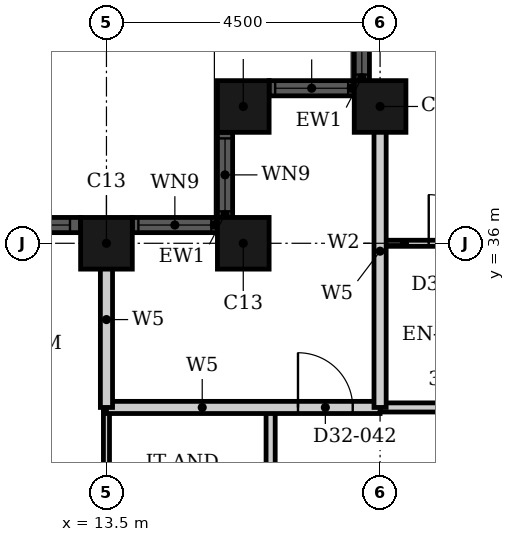
"""IFC4 building model, lengths in metres.
Left out: names, types, materials, properties, quantities, classifications, styles, units other than length and angle.
Written with IfcOpenShell. Run it as: python <this file> out.ifc"""

import sys

from ifc_helpers import new_model, si_unit, direction, frame, frame_2d, origin, origin_2d, place, context, subcontext, project, spatial, rectangle, hollow_rectangle, extrude, element, fill, save


model = new_model("IFC4")
c1 = context("Model", 3, precision=1e-05, world=origin(), true_north=direction((0.0, 1.0)))
c2 = subcontext(c1, "Body", "Model", "MODEL_VIEW")
j1 = project(units=[si_unit("LENGTHUNIT", "METRE"), si_unit("PLANEANGLEUNIT", "RADIAN")], contexts=[c1])
p1 = place(None, origin())
s1 = spatial("IfcSite", under=j1, at=p1, CompositionType="ELEMENT")
p2 = place(p1, origin())
s2 = spatial("IfcBuilding", under=s1, at=p2, CompositionType="ELEMENT")
p3 = place(p2, frame((0.0, 0.0, 129.6)))
s3 = spatial("IfcBuildingStorey", under=s2, at=p3, CompositionType="ELEMENT", Elevation=129.6)
for number, where, z_axis, x_axis in (
    (1, (18.0, 38.25, 0.0), (0.0, 0.0, 1.0), (1.0, 0.0, 0.0)),
    (2, (15.75, 38.25, 0.0), (0.0, 0.0, 1.0), (1.0, 0.0, 0.0)),
    (3, (15.75, 36.0, 0.0), (0.0, 0.0, 1.0), (1.0, 0.0, 0.0)),
    (4, (13.5, 36.0, 0.0), (0.0, 0.0, 1.0), (1.0, 0.0, 0.0)),
):
    element("IfcColumn", number, at=place(p3, frame(where, z_axis=z_axis, x_axis=x_axis)), inside=s3, PredefinedType="COLUMN", context=c2, shape_type="SweptSolid", body=[
        extrude(hollow_rectangle(XDim=0.85, YDim=0.85, WallThickness=0.026, at=origin_2d()), origin(), (0.0, 0.0, 1.0), 3.6),
    ])
p4 = place(p3, frame((17.7, 40.075, 0.0), z_axis=(0.0, 0.0, 1.0), x_axis=(0.0, -1.0, 0.0)))
e5 = element("IfcWall", 5, at=p4, inside=s3, PredefinedType="SOLIDWALL", context=c2, shape_type="SweptSolid", body=[
    extrude(rectangle(XDim=1.4, YDim=0.25, at=frame_2d((0.7, 0.0))), origin(), (0.0, 0.0, 1.0), 3.6),
])
p5 = place(p4, frame((0.1, 0.0, 0.9)))
e6 = element("IfcOpeningElement", 6, at=p5, cuts=e5, PredefinedType="OPENING", context=c2, shape_type="SweptSolid", body=[
    extrude(rectangle(XDim=1.2, YDim=2.08, at=frame_2d((0.6, 1.04))), frame((0.0, 0.135, 0.0), z_axis=(0.0, -1.0, 0.0), x_axis=(1.0, 0.0, 0.0)), (0.0, 0.0, 1.0), 0.27),
])
p6 = place(p3, frame((17.575, 38.55, 0.0), z_axis=(0.0, 0.0, 1.0), x_axis=(-1.0, 0.0, 0.0)))
e7 = element("IfcWall", 7, at=p6, inside=s3, PredefinedType="SOLIDWALL", context=c2, shape_type="SweptSolid", body=[
    extrude(rectangle(XDim=1.4, YDim=0.25, at=frame_2d((0.7, 0.0))), origin(), (0.0, 0.0, 1.0), 3.6),
])
p7 = place(p6, frame((0.1, 0.0, 0.9)))
e8 = element("IfcOpeningElement", 8, at=p7, cuts=e7, PredefinedType="OPENING", context=c2, shape_type="SweptSolid", body=[
    extrude(rectangle(XDim=1.2, YDim=2.08, at=frame_2d((0.6, 1.04))), frame((0.0, 0.135, 0.0), z_axis=(0.0, -1.0, 0.0), x_axis=(1.0, 0.0, 0.0)), (0.0, 0.0, 1.0), 0.27),
])
p8 = place(p3, frame((15.45, 37.825, 0.0), z_axis=(0.0, 0.0, 1.0), x_axis=(0.0, -1.0, 0.0)))
e9 = element("IfcWall", 9, at=p8, inside=s3, PredefinedType="SOLIDWALL", context=c2, shape_type="SweptSolid", body=[
    extrude(rectangle(XDim=1.4, YDim=0.25, at=frame_2d((0.7, 0.0))), origin(), (0.0, 0.0, 1.0), 3.6),
])
p9 = place(p8, frame((0.1, 0.0, 0.9)))
e10 = element("IfcOpeningElement", 10, at=p9, cuts=e9, PredefinedType="OPENING", context=c2, shape_type="SweptSolid", body=[
    extrude(rectangle(XDim=1.2, YDim=2.08, at=frame_2d((0.6, 1.04))), frame((0.0, 0.135, 0.0), z_axis=(0.0, -1.0, 0.0), x_axis=(1.0, 0.0, 0.0)), (0.0, 0.0, 1.0), 0.27),
])
p10 = place(p3, frame((15.325, 36.3, 0.0), z_axis=(0.0, 0.0, 1.0), x_axis=(-1.0, 0.0, 0.0)))
e11 = element("IfcWall", 11, at=p10, inside=s3, PredefinedType="SOLIDWALL", context=c2, shape_type="SweptSolid", body=[
    extrude(rectangle(XDim=1.4, YDim=0.25, at=frame_2d((0.7, 0.0))), origin(), (0.0, 0.0, 1.0), 3.6),
])
p11 = place(p10, frame((0.1, 0.0, 0.9)))
e12 = element("IfcOpeningElement", 12, at=p11, cuts=e11, PredefinedType="OPENING", context=c2, shape_type="SweptSolid", body=[
    extrude(rectangle(XDim=1.2, YDim=2.08, at=frame_2d((0.6, 1.04))), frame((0.0, 0.135, 0.0), z_axis=(0.0, -1.0, 0.0), x_axis=(1.0, 0.0, 0.0)), (0.0, 0.0, 1.0), 0.27),
])
p12 = place(p3, frame((13.075, 36.3, 0.0), z_axis=(0.0, 0.0, 1.0), x_axis=(-1.0, 0.0, 0.0)))
e13 = element("IfcWall", 13, at=p12, inside=s3, PredefinedType="SOLIDWALL", context=c2, shape_type="SweptSolid", body=[
    extrude(rectangle(XDim=8.15, YDim=0.25, at=frame_2d((4.075, 0.0))), origin(), (0.0, 0.0, 1.0), 3.6),
])
p13 = place(p12, frame((0.175, 0.0, 0.9)))
e14 = element("IfcOpeningElement", 14, at=p13, cuts=e13, PredefinedType="OPENING", context=c2, shape_type="SweptSolid", body=[
    extrude(rectangle(XDim=3.3, YDim=2.08, at=frame_2d((1.65, 1.04))), frame((0.0, 0.135, 0.0), z_axis=(0.0, -1.0, 0.0), x_axis=(1.0, 0.0, 0.0)), (0.0, 0.0, 1.0), 0.27),
])
p14 = place(p12, frame((4.675, 0.0, 0.9)))
e15 = element("IfcOpeningElement", 15, at=p14, cuts=e13, PredefinedType="OPENING", context=c2, shape_type="SweptSolid", body=[
    extrude(rectangle(XDim=3.3, YDim=2.08, at=frame_2d((1.65, 1.04))), frame((0.0, 0.135, 0.0), z_axis=(0.0, -1.0, 0.0), x_axis=(1.0, 0.0, 0.0)), (0.0, 0.0, 1.0), 0.27),
])
p15 = place(p3, frame((18.0, 33.3, 0.0), z_axis=(0.0, 0.0, 1.0), x_axis=(1.0, 0.0, 0.0)))
e16 = element("IfcWall", 16, at=p15, inside=s3, PredefinedType="PARTITIONING", context=c2, shape_type="SweptSolid", body=[
    extrude(rectangle(XDim=13.5, YDim=0.15, at=frame_2d((6.75, 0.0))), origin(), (0.0, 0.0, 1.0), 3.3),
])
p16 = place(p15, frame((2.95, 0.0, 0.0)))
e17 = element("IfcOpeningElement", 17, at=p16, cuts=e16, PredefinedType="OPENING", context=c2, shape_type="SweptSolid", body=[
    extrude(rectangle(XDim=1.0, YDim=2.1, at=frame_2d((0.5, 1.05))), frame((0.0, 0.085, 0.0), z_axis=(0.0, -1.0, 0.0), x_axis=(1.0, 0.0, 0.0)), (0.0, 0.0, 1.0), 0.17),
])
p17 = place(p15, frame((5.85, 0.0, 0.0)))
e18 = element("IfcOpeningElement", 18, at=p17, cuts=e16, PredefinedType="OPENING", context=c2, shape_type="SweptSolid", body=[
    extrude(rectangle(XDim=0.9, YDim=2.1, at=frame_2d((0.45, 1.05))), frame((0.0, 0.085, 0.0), z_axis=(0.0, -1.0, 0.0), x_axis=(1.0, 0.0, 0.0)), (0.0, 0.0, 1.0), 0.17),
])
p18 = place(p15, frame((10.35, 0.0, 0.0)))
e19 = element("IfcOpeningElement", 19, at=p18, cuts=e16, PredefinedType="OPENING", context=c2, shape_type="SweptSolid", body=[
    extrude(rectangle(XDim=0.9, YDim=2.1, at=frame_2d((0.45, 1.05))), frame((0.0, 0.085, 0.0), z_axis=(0.0, -1.0, 0.0), x_axis=(1.0, 0.0, 0.0)), (0.0, 0.0, 1.0), 0.17),
])
p19 = place(p3, frame((16.2, 27.0, 0.0), z_axis=(0.0, 0.0, 1.0), x_axis=(0.0, 1.0, 0.0)))
e20 = element("IfcWall", 20, at=p19, inside=s3, PredefinedType="PARTITIONING", context=c2, shape_type="SweptSolid", body=[
    extrude(rectangle(XDim=6.3, YDim=0.15, at=frame_2d((3.15, 0.0))), origin(), (0.0, 0.0, 1.0), 3.3),
])
p20 = place(p19, frame((2.55, 0.0, 0.0)))
e21 = element("IfcOpeningElement", 21, at=p20, cuts=e20, PredefinedType="OPENING", context=c2, shape_type="SweptSolid", body=[
    extrude(rectangle(XDim=0.9, YDim=2.1, at=frame_2d((0.45, 1.05))), frame((0.0, 0.085, 0.0), z_axis=(0.0, -1.0, 0.0), x_axis=(1.0, 0.0, 0.0)), (0.0, 0.0, 1.0), 0.17),
])
p21 = place(p3, frame((13.5, 27.0, 0.0), z_axis=(0.0, 0.0, 1.0), x_axis=(0.0, 1.0, 0.0)))
e22 = element("IfcWall", 22, at=p21, inside=s3, PredefinedType="PARTITIONING", context=c2, shape_type="SweptSolid", body=[
    extrude(rectangle(XDim=6.3, YDim=0.1, at=frame_2d((3.15, 0.0))), origin(), (0.0, 0.0, 1.0), 2.38),
])
p22 = place(p3, frame((18.0, 36.0, 0.0), z_axis=(0.0, 0.0, 1.0), x_axis=(1.0, 0.0, 0.0)))
e23 = element("IfcWall", 23, at=p22, inside=s3, PredefinedType="PARTITIONING", context=c2, shape_type="SweptSolid", body=[
    extrude(rectangle(XDim=2.4, YDim=0.1, at=frame_2d((1.2, 0.0))), origin(), (0.0, 0.0, 1.0), 3.3),
])
p23 = place(p22, frame((0.8, 0.0, 0.0)))
e24 = element("IfcOpeningElement", 24, at=p23, cuts=e23, PredefinedType="OPENING", context=c2, shape_type="SweptSolid", body=[
    extrude(rectangle(XDim=0.8, YDim=2.1, at=frame_2d((0.4, 1.05))), frame((0.0, 0.06, 0.0), z_axis=(0.0, -1.0, 0.0), x_axis=(1.0, 0.0, 0.0)), (0.0, 0.0, 1.0), 0.12),
])
p24 = place(p3, frame((13.5, 33.3, 0.0), z_axis=(0.0, 0.0, 1.0), x_axis=(1.0, 0.0, 0.0)))
e25 = element("IfcWall", 25, at=p24, inside=s3, PredefinedType="PARTITIONING", context=c2, shape_type="SweptSolid", body=[
    extrude(rectangle(XDim=4.5, YDim=0.2, at=frame_2d((2.25, 0.0))), origin(), (0.0, 0.0, 1.0), 3.3),
])
p25 = place(p24, frame((3.15, 0.0, 0.0)))
e26 = element("IfcOpeningElement", 26, at=p25, cuts=e25, PredefinedType="OPENING", context=c2, shape_type="SweptSolid", body=[
    extrude(rectangle(XDim=0.9, YDim=2.1, at=frame_2d((0.45, 1.05))), frame((0.0, 0.11, 0.0), z_axis=(0.0, -1.0, 0.0), x_axis=(1.0, 0.0, 0.0)), (0.0, 0.0, 1.0), 0.22),
])
p26 = place(p3, frame((13.5, 33.3, 0.0), z_axis=(0.0, 0.0, 1.0), x_axis=(0.0, 1.0, 0.0)))
e27 = element("IfcWall", 27, at=p26, inside=s3, PredefinedType="PARTITIONING", context=c2, shape_type="SweptSolid", body=[
    extrude(rectangle(XDim=2.89, YDim=0.2, at=frame_2d((1.445, 0.0))), origin(), (0.0, 0.0, 1.0), 2.38),
])
p27 = place(p3, frame((18.0, 33.3, 0.0), z_axis=(0.0, 0.0, 1.0), x_axis=(0.0, 1.0, 0.0)))
e28 = element("IfcWall", 28, at=p27, inside=s3, PredefinedType="PARTITIONING", context=c2, shape_type="SweptSolid", body=[
    extrude(rectangle(XDim=5.14, YDim=0.2, at=frame_2d((2.57, 0.0))), origin(), (0.0, 0.0, 1.0), 3.3),
])
p28 = place(p5, origin())
e29 = element("IfcWindow", 29, at=p28, inside=s3, PartitioningType="SINGLE_PANEL", PredefinedType="WINDOW", context=c2, shape_type="SweptSolid", body=[
    extrude(rectangle(XDim=1.2, YDim=2.08, at=frame_2d((0.6, 1.04))), frame((0.0, 0.03, 0.0), z_axis=(0.0, -1.0, 0.0), x_axis=(1.0, 0.0, 0.0)), (0.0, 0.0, 1.0), 0.06),
])
fill(e6, e29)
p29 = place(p7, origin())
e30 = element("IfcWindow", 30, at=p29, inside=s3, PartitioningType="SINGLE_PANEL", PredefinedType="WINDOW", context=c2, shape_type="SweptSolid", body=[
    extrude(rectangle(XDim=1.2, YDim=2.08, at=frame_2d((0.6, 1.04))), frame((0.0, 0.03, 0.0), z_axis=(0.0, -1.0, 0.0), x_axis=(1.0, 0.0, 0.0)), (0.0, 0.0, 1.0), 0.06),
])
fill(e8, e30)
p30 = place(p9, origin())
e31 = element("IfcWindow", 31, at=p30, inside=s3, PartitioningType="SINGLE_PANEL", PredefinedType="WINDOW", context=c2, shape_type="SweptSolid", body=[
    extrude(rectangle(XDim=1.2, YDim=2.08, at=frame_2d((0.6, 1.04))), frame((0.0, 0.03, 0.0), z_axis=(0.0, -1.0, 0.0), x_axis=(1.0, 0.0, 0.0)), (0.0, 0.0, 1.0), 0.06),
])
fill(e10, e31)
p31 = place(p11, origin())
e32 = element("IfcWindow", 32, at=p31, inside=s3, PartitioningType="SINGLE_PANEL", PredefinedType="WINDOW", context=c2, shape_type="SweptSolid", body=[
    extrude(rectangle(XDim=1.2, YDim=2.08, at=frame_2d((0.6, 1.04))), frame((0.0, 0.03, 0.0), z_axis=(0.0, -1.0, 0.0), x_axis=(1.0, 0.0, 0.0)), (0.0, 0.0, 1.0), 0.06),
])
fill(e12, e32)
p32 = place(p13, origin())
e33 = element("IfcWindow", 33, at=p32, inside=s3, PartitioningType="SINGLE_PANEL", PredefinedType="WINDOW", context=c2, shape_type="SweptSolid", body=[
    extrude(rectangle(XDim=3.3, YDim=2.08, at=frame_2d((1.65, 1.04))), frame((0.0, 0.03, 0.0), z_axis=(0.0, -1.0, 0.0), x_axis=(1.0, 0.0, 0.0)), (0.0, 0.0, 1.0), 0.06),
])
fill(e14, e33)
p33 = place(p23, origin())
e34 = element("IfcDoor", 34, at=p33, inside=s3, OperationType="SINGLE_SWING_LEFT", PredefinedType="DOOR", context=c2, shape_type="SweptSolid", body=[
    extrude(rectangle(XDim=0.8, YDim=2.1, at=frame_2d((0.4, 1.05))), frame((0.0, 0.025, 0.0), z_axis=(0.0, -1.0, 0.0), x_axis=(1.0, 0.0, 0.0)), (0.0, 0.0, 1.0), 0.05),
])
fill(e24, e34)
p34 = place(p25, origin())
e35 = element("IfcDoor", 35, at=p34, inside=s3, OperationType="SINGLE_SWING_LEFT", PredefinedType="DOOR", context=c2, shape_type="SweptSolid", body=[
    extrude(rectangle(XDim=0.9, YDim=2.1, at=frame_2d((0.45, 1.05))), frame((0.0, 0.025, 0.0), z_axis=(0.0, -1.0, 0.0), x_axis=(1.0, 0.0, 0.0)), (0.0, 0.0, 1.0), 0.05),
])
fill(e26, e35)
save(model, sys.argv[1])
